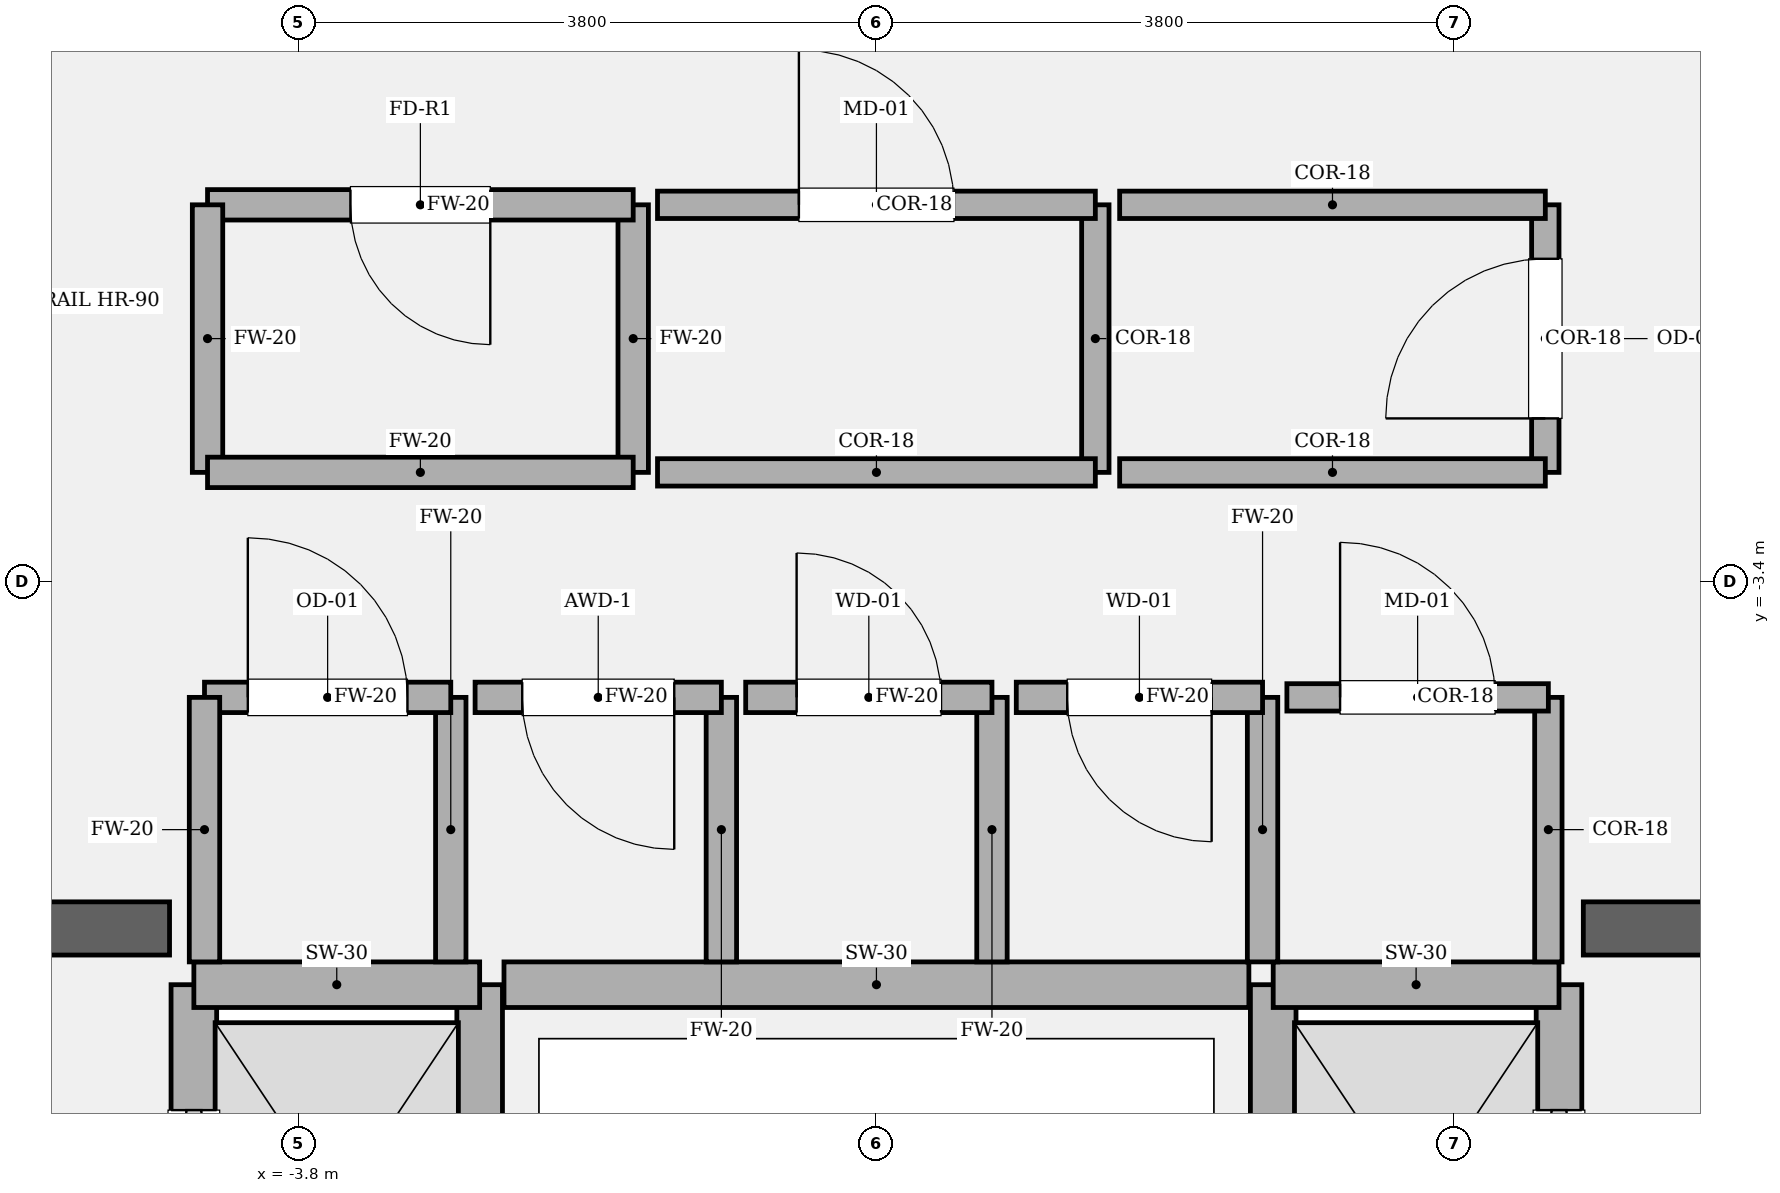
"""IFC4 building model, lengths in metres.
Left out: names, types, materials, properties, quantities, classifications, styles, units other than length and angle.
Written with IfcOpenShell. Run it as: python <this file> out.ifc"""

import sys

from ifc_helpers import new_model, si_unit, direction, frame, frame_2d, origin, place, context, subcontext, project, spatial, rectangle, extrude, element, fill, save


model = new_model("IFC4")
c1 = context("Model", 3, precision=1e-05, world=origin(), true_north=direction((0.0, 1.0)))
c2 = subcontext(c1, "Body", "Model", "MODEL_VIEW")
j1 = project(units=[si_unit("LENGTHUNIT", "METRE"), si_unit("PLANEANGLEUNIT", "RADIAN")], contexts=[c1])
p1 = place(None, origin())
s1 = spatial("IfcSite", under=j1, at=p1, CompositionType="ELEMENT")
p2 = place(p1, origin())
s2 = spatial("IfcBuilding", under=s1, at=p2, CompositionType="ELEMENT")
p3 = place(p2, frame((0.0, 0.0, 135.0)))
s3 = spatial("IfcBuildingStorey", under=s2, at=p3, CompositionType="ELEMENT", Elevation=135.0)
p4 = place(p3, frame((-9.875, -5.68, 0.0), z_axis=(0.0, 0.0, 1.0), x_axis=(1.0, 0.0, 0.0)))
e1 = element("IfcWall", 1, at=p4, inside=s3, PredefinedType="SOLIDWALL", context=c2, shape_type="SweptSolid", body=[
    extrude(rectangle(XDim=5.225, YDim=0.35, at=frame_2d((2.613, 0.0))), origin(), (0.0, 0.0, 1.0), 4.8),
])
p5 = place(p4, frame((1.335, 0.0, 0.0)))
e2 = element("IfcOpeningElement", 2, at=p5, cuts=e1, PredefinedType="OPENING", context=c2, shape_type="SweptSolid", body=[
    extrude(rectangle(XDim=1.18, YDim=2.2, at=frame_2d((0.59, 1.1))), frame((0.0, 0.185, 0.0), z_axis=(0.0, -1.0, 0.0), x_axis=(1.0, 0.0, 0.0)), (0.0, 0.0, 1.0), 0.37),
])
p6 = place(p3, frame((4.65, -5.68, 0.0), z_axis=(0.0, 0.0, 1.0), x_axis=(1.0, 0.0, 0.0)))
e3 = element("IfcWall", 3, at=p6, inside=s3, PredefinedType="SOLIDWALL", context=c2, shape_type="SweptSolid", body=[
    extrude(rectangle(XDim=5.225, YDim=0.35, at=frame_2d((2.613, 0.0))), origin(), (0.0, 0.0, 1.0), 4.8),
])
p7 = place(p6, frame((2.71, 0.0, 0.0)))
e4 = element("IfcOpeningElement", 4, at=p7, cuts=e3, PredefinedType="OPENING", context=c2, shape_type="SweptSolid", body=[
    extrude(rectangle(XDim=1.18, YDim=2.2, at=frame_2d((0.59, 1.1))), frame((0.0, 0.185, 0.0), z_axis=(0.0, -1.0, 0.0), x_axis=(1.0, 0.0, 0.0)), (0.0, 0.0, 1.0), 0.37),
])
p8 = place(p3, frame((-4.49, -8.82, 0.0), z_axis=(0.0, 0.0, 1.0), x_axis=(0.0, 1.0, 0.0)))
e5 = element("IfcWall", 5, at=p8, inside=s3, PredefinedType="SOLIDWALL", context=c2, shape_type="SweptSolid", body=[
    extrude(rectangle(XDim=2.77, YDim=0.3, at=frame_2d((1.385, 0.0))), origin(), (0.0, 0.0, 1.0), 4.52),
])
p9 = place(p8, frame((0.825, 0.0, 0.0)))
e6 = element("IfcOpeningElement", 6, at=p9, cuts=e5, PredefinedType="OPENING", context=c2, shape_type="SweptSolid", body=[
    extrude(rectangle(XDim=1.12, YDim=2.25, at=frame_2d((0.56, 1.125))), frame((0.0, 0.16, 0.0), z_axis=(0.0, -1.0, 0.0), x_axis=(1.0, 0.0, 0.0)), (0.0, 0.0, 1.0), 0.32),
])
p10 = place(p3, frame((-2.61, -8.82, 0.0), z_axis=(0.0, 0.0, 1.0), x_axis=(0.0, 1.0, 0.0)))
e7 = element("IfcWall", 7, at=p10, inside=s3, PredefinedType="SOLIDWALL", context=c2, shape_type="SweptSolid", body=[
    extrude(rectangle(XDim=2.77, YDim=0.3, at=frame_2d((1.385, 0.0))), origin(), (0.0, 0.0, 1.0), 4.52),
])
p11 = place(p3, frame((-4.49, -6.05, 0.0), z_axis=(0.0, 0.0, 1.0), x_axis=(1.0, 0.0, 0.0)))
e8 = element("IfcWall", 8, at=p11, inside=s3, PredefinedType="SOLIDWALL", context=c2, shape_type="SweptSolid", body=[
    extrude(rectangle(XDim=1.88, YDim=0.3, at=frame_2d((0.94, 0.0))), origin(), (0.0, 0.0, 1.0), 4.52),
])
p12 = place(p3, frame((4.49, -8.82, 0.0), z_axis=(0.0, 0.0, 1.0), x_axis=(0.0, 1.0, 0.0)))
e9 = element("IfcWall", 9, at=p12, inside=s3, PredefinedType="SOLIDWALL", context=c2, shape_type="SweptSolid", body=[
    extrude(rectangle(XDim=2.77, YDim=0.3, at=frame_2d((1.385, 0.0))), origin(), (0.0, 0.0, 1.0), 4.52),
])
p13 = place(p12, frame((0.825, 0.0, 0.0)))
e10 = element("IfcOpeningElement", 10, at=p13, cuts=e9, PredefinedType="OPENING", context=c2, shape_type="SweptSolid", body=[
    extrude(rectangle(XDim=1.12, YDim=2.25, at=frame_2d((0.56, 1.125))), frame((0.0, 0.16, 0.0), z_axis=(0.0, -1.0, 0.0), x_axis=(1.0, 0.0, 0.0)), (0.0, 0.0, 1.0), 0.32),
])
p14 = place(p3, frame((2.61, -8.82, 0.0), z_axis=(0.0, 0.0, 1.0), x_axis=(0.0, 1.0, 0.0)))
e11 = element("IfcWall", 11, at=p14, inside=s3, PredefinedType="SOLIDWALL", context=c2, shape_type="SweptSolid", body=[
    extrude(rectangle(XDim=2.77, YDim=0.3, at=frame_2d((1.385, 0.0))), origin(), (0.0, 0.0, 1.0), 4.52),
])
p15 = place(p3, frame((2.61, -6.05, 0.0), z_axis=(0.0, 0.0, 1.0), x_axis=(1.0, 0.0, 0.0)))
e12 = element("IfcWall", 12, at=p15, inside=s3, PredefinedType="SOLIDWALL", context=c2, shape_type="SweptSolid", body=[
    extrude(rectangle(XDim=1.88, YDim=0.3, at=frame_2d((0.94, 0.0))), origin(), (0.0, 0.0, 1.0), 4.52),
])
p16 = place(p3, frame((-2.45, -6.05, 0.0), z_axis=(0.0, 0.0, 1.0), x_axis=(1.0, 0.0, 0.0)))
e13 = element("IfcWall", 13, at=p16, inside=s3, PredefinedType="SOLIDWALL", context=c2, shape_type="SweptSolid", body=[
    extrude(rectangle(XDim=4.9, YDim=0.3, at=frame_2d((2.45, 0.0))), origin(), (0.0, 0.0, 1.0), 4.52),
])
p17 = place(p3, frame((-2.8, -5.9, 0.0), z_axis=(0.0, 0.0, 1.0), x_axis=(0.0, 1.0, 0.0)))
e14 = element("IfcWall", 14, at=p17, inside=s3, PredefinedType="SOLIDWALL", context=c2, shape_type="SweptSolid", body=[
    extrude(rectangle(XDim=1.74, YDim=0.2, at=frame_2d((0.87, 0.0))), origin(), (0.0, 0.0, 1.0), 4.52),
])
p18 = place(p3, frame((-2.8, -4.16, 0.0), z_axis=(0.0, 0.0, 1.0), x_axis=(-1.0, 0.0, 0.0)))
e15 = element("IfcWall", 15, at=p18, inside=s3, PredefinedType="SOLIDWALL", context=c2, shape_type="SweptSolid", body=[
    extrude(rectangle(XDim=1.62, YDim=0.2, at=frame_2d((0.81, 0.0))), origin(), (0.0, 0.0, 1.0), 4.52),
])
p19 = place(p18, frame((0.285, 0.0, 0.0)))
e16 = element("IfcOpeningElement", 16, at=p19, cuts=e15, PredefinedType="OPENING", context=c2, shape_type="SweptSolid", body=[
    extrude(rectangle(XDim=1.05, YDim=2.2, at=frame_2d((0.525, 1.1))), frame((0.0, 0.11, 0.0), z_axis=(0.0, -1.0, 0.0), x_axis=(1.0, 0.0, 0.0)), (0.0, 0.0, 1.0), 0.22),
])
for number, where, z_axis, x_axis in (
    (17, (-4.42, -4.16, 0.0), (0.0, 0.0, 1.0), (0.0, -1.0, 0.0)),
    (18, (-1.02, -5.9, 0.0), (0.0, 0.0, 1.0), (0.0, 1.0, 0.0)),
):
    element("IfcWall", number, at=place(p3, frame(where, z_axis=z_axis, x_axis=x_axis)), inside=s3, PredefinedType="SOLIDWALL", context=c2, shape_type="SweptSolid", body=[
        extrude(rectangle(XDim=1.74, YDim=0.2, at=frame_2d((0.87, 0.0))), origin(), (0.0, 0.0, 1.0), 4.52),
    ])
p20 = place(p3, frame((-1.02, -4.16, 0.0), z_axis=(0.0, 0.0, 1.0), x_axis=(-1.0, 0.0, 0.0)))
e19 = element("IfcWall", 19, at=p20, inside=s3, PredefinedType="SOLIDWALL", context=c2, shape_type="SweptSolid", body=[
    extrude(rectangle(XDim=1.62, YDim=0.2, at=frame_2d((0.81, 0.0))), origin(), (0.0, 0.0, 1.0), 4.52),
])
p21 = place(p20, frame((0.31, 0.0, 0.0)))
e20 = element("IfcOpeningElement", 20, at=p21, cuts=e19, PredefinedType="OPENING", context=c2, shape_type="SweptSolid", body=[
    extrude(rectangle(XDim=1.0, YDim=2.15, at=frame_2d((0.5, 1.075))), frame((0.0, 0.11, 0.0), z_axis=(0.0, -1.0, 0.0), x_axis=(1.0, 0.0, 0.0)), (0.0, 0.0, 1.0), 0.22),
])
p22 = place(p3, frame((0.76, -5.9, 0.0), z_axis=(0.0, 0.0, 1.0), x_axis=(0.0, 1.0, 0.0)))
e21 = element("IfcWall", 21, at=p22, inside=s3, PredefinedType="SOLIDWALL", context=c2, shape_type="SweptSolid", body=[
    extrude(rectangle(XDim=1.74, YDim=0.2, at=frame_2d((0.87, 0.0))), origin(), (0.0, 0.0, 1.0), 4.52),
])
p23 = place(p3, frame((0.76, -4.16, 0.0), z_axis=(0.0, 0.0, 1.0), x_axis=(-1.0, 0.0, 0.0)))
e22 = element("IfcWall", 22, at=p23, inside=s3, PredefinedType="SOLIDWALL", context=c2, shape_type="SweptSolid", body=[
    extrude(rectangle(XDim=1.62, YDim=0.2, at=frame_2d((0.81, 0.0))), origin(), (0.0, 0.0, 1.0), 4.52),
])
p24 = place(p23, frame((0.335, 0.0, 0.0)))
e23 = element("IfcOpeningElement", 23, at=p24, cuts=e22, PredefinedType="OPENING", context=c2, shape_type="SweptSolid", body=[
    extrude(rectangle(XDim=0.95, YDim=2.15, at=frame_2d((0.475, 1.075))), frame((0.0, 0.11, 0.0), z_axis=(0.0, -1.0, 0.0), x_axis=(1.0, 0.0, 0.0)), (0.0, 0.0, 1.0), 0.22),
])
p25 = place(p3, frame((2.54, -5.9, 0.0), z_axis=(0.0, 0.0, 1.0), x_axis=(0.0, 1.0, 0.0)))
e24 = element("IfcWall", 24, at=p25, inside=s3, PredefinedType="SOLIDWALL", context=c2, shape_type="SweptSolid", body=[
    extrude(rectangle(XDim=1.74, YDim=0.2, at=frame_2d((0.87, 0.0))), origin(), (0.0, 0.0, 1.0), 4.52),
])
p26 = place(p3, frame((2.54, -4.16, 0.0), z_axis=(0.0, 0.0, 1.0), x_axis=(-1.0, 0.0, 0.0)))
e25 = element("IfcWall", 25, at=p26, inside=s3, PredefinedType="SOLIDWALL", context=c2, shape_type="SweptSolid", body=[
    extrude(rectangle(XDim=1.62, YDim=0.2, at=frame_2d((0.81, 0.0))), origin(), (0.0, 0.0, 1.0), 4.52),
])
p27 = place(p26, frame((0.335, 0.0, 0.0)))
e26 = element("IfcOpeningElement", 26, at=p27, cuts=e25, PredefinedType="OPENING", context=c2, shape_type="SweptSolid", body=[
    extrude(rectangle(XDim=0.95, YDim=2.15, at=frame_2d((0.475, 1.075))), frame((0.0, 0.11, 0.0), z_axis=(0.0, -1.0, 0.0), x_axis=(1.0, 0.0, 0.0)), (0.0, 0.0, 1.0), 0.22),
])
p28 = place(p3, frame((4.42, -5.9, 0.0), z_axis=(0.0, 0.0, 1.0), x_axis=(0.0, 1.0, 0.0)))
e27 = element("IfcWall", 27, at=p28, inside=s3, PredefinedType="PARTITIONING", context=c2, shape_type="SweptSolid", body=[
    extrude(rectangle(XDim=1.74, YDim=0.18, at=frame_2d((0.87, 0.0))), origin(), (0.0, 0.0, 1.0), 4.52),
])
p29 = place(p3, frame((4.42, -4.16, 0.0), z_axis=(0.0, 0.0, 1.0), x_axis=(-1.0, 0.0, 0.0)))
e28 = element("IfcWall", 28, at=p29, inside=s3, PredefinedType="PARTITIONING", context=c2, shape_type="SweptSolid", body=[
    extrude(rectangle(XDim=1.72, YDim=0.18, at=frame_2d((0.86, 0.0))), origin(), (0.0, 0.0, 1.0), 4.52),
])
p30 = place(p29, frame((0.35, 0.0, 0.0)))
e29 = element("IfcOpeningElement", 29, at=p30, cuts=e28, PredefinedType="OPENING", context=c2, shape_type="SweptSolid", body=[
    extrude(rectangle(XDim=1.02, YDim=2.2, at=frame_2d((0.51, 1.1))), frame((0.0, 0.1, 0.0), z_axis=(0.0, -1.0, 0.0), x_axis=(1.0, 0.0, 0.0)), (0.0, 0.0, 1.0), 0.2),
])
p31 = place(p3, frame((-1.6, -2.68, 0.0), z_axis=(0.0, 0.0, 1.0), x_axis=(0.0, 1.0, 0.0)))
e30 = element("IfcWall", 30, at=p31, inside=s3, PredefinedType="SOLIDWALL", context=c2, shape_type="SweptSolid", body=[
    extrude(rectangle(XDim=1.76, YDim=0.2, at=frame_2d((0.88, 0.0))), origin(), (0.0, 0.0, 1.0), 4.52),
])
p32 = place(p3, frame((-1.6, -0.92, 0.0), z_axis=(0.0, 0.0, 1.0), x_axis=(-1.0, 0.0, 0.0)))
e31 = element("IfcWall", 31, at=p32, inside=s3, PredefinedType="SOLIDWALL", context=c2, shape_type="SweptSolid", body=[
    extrude(rectangle(XDim=2.8, YDim=0.2, at=frame_2d((1.4, 0.0))), origin(), (0.0, 0.0, 1.0), 4.52),
])
p33 = place(p32, frame((0.94, 0.0, 0.0)))
e32 = element("IfcOpeningElement", 32, at=p33, cuts=e31, PredefinedType="OPENING", context=c2, shape_type="SweptSolid", body=[
    extrude(rectangle(XDim=0.92, YDim=2.1, at=frame_2d((0.46, 1.05))), frame((0.0, 0.11, 0.0), z_axis=(0.0, -1.0, 0.0), x_axis=(1.0, 0.0, 0.0)), (0.0, 0.0, 1.0), 0.22),
])
p34 = place(p3, frame((-4.4, -0.92, 0.0), z_axis=(0.0, 0.0, 1.0), x_axis=(0.0, -1.0, 0.0)))
e33 = element("IfcWall", 33, at=p34, inside=s3, PredefinedType="SOLIDWALL", context=c2, shape_type="SweptSolid", body=[
    extrude(rectangle(XDim=1.76, YDim=0.2, at=frame_2d((0.88, 0.0))), origin(), (0.0, 0.0, 1.0), 4.52),
])
p35 = place(p3, frame((-4.4, -2.68, 0.0), z_axis=(0.0, 0.0, 1.0), x_axis=(1.0, 0.0, 0.0)))
e34 = element("IfcWall", 34, at=p35, inside=s3, PredefinedType="SOLIDWALL", context=c2, shape_type="SweptSolid", body=[
    extrude(rectangle(XDim=2.8, YDim=0.2, at=frame_2d((1.4, 0.0))), origin(), (0.0, 0.0, 1.0), 4.52),
])
p36 = place(p3, frame((1.44, -2.68, 0.0), z_axis=(0.0, 0.0, 1.0), x_axis=(0.0, 1.0, 0.0)))
e35 = element("IfcWall", 35, at=p36, inside=s3, PredefinedType="PARTITIONING", context=c2, shape_type="SweptSolid", body=[
    extrude(rectangle(XDim=1.76, YDim=0.18, at=frame_2d((0.88, 0.0))), origin(), (0.0, 0.0, 1.0), 4.52),
])
p37 = place(p3, frame((1.44, -0.92, 0.0), z_axis=(0.0, 0.0, 1.0), x_axis=(-1.0, 0.0, 0.0)))
e36 = element("IfcWall", 36, at=p37, inside=s3, PredefinedType="PARTITIONING", context=c2, shape_type="SweptSolid", body=[
    extrude(rectangle(XDim=2.88, YDim=0.18, at=frame_2d((1.44, 0.0))), origin(), (0.0, 0.0, 1.0), 4.52),
])
p38 = place(p37, frame((0.93, 0.0, 0.0)))
e37 = element("IfcOpeningElement", 37, at=p38, cuts=e36, PredefinedType="OPENING", context=c2, shape_type="SweptSolid", body=[
    extrude(rectangle(XDim=1.02, YDim=2.2, at=frame_2d((0.51, 1.1))), frame((0.0, 0.1, 0.0), z_axis=(0.0, -1.0, 0.0), x_axis=(1.0, 0.0, 0.0)), (0.0, 0.0, 1.0), 0.2),
])
p39 = place(p3, frame((-1.44, -2.68, 0.0), z_axis=(0.0, 0.0, 1.0), x_axis=(1.0, 0.0, 0.0)))
e38 = element("IfcWall", 38, at=p39, inside=s3, PredefinedType="PARTITIONING", context=c2, shape_type="SweptSolid", body=[
    extrude(rectangle(XDim=2.88, YDim=0.18, at=frame_2d((1.44, 0.0))), origin(), (0.0, 0.0, 1.0), 4.52),
])
p40 = place(p3, frame((4.4, -2.68, 0.0), z_axis=(0.0, 0.0, 1.0), x_axis=(0.0, 1.0, 0.0)))
e39 = element("IfcWall", 39, at=p40, inside=s3, PredefinedType="PARTITIONING", context=c2, shape_type="SweptSolid", body=[
    extrude(rectangle(XDim=1.76, YDim=0.18, at=frame_2d((0.88, 0.0))), origin(), (0.0, 0.0, 1.0), 4.52),
])
p41 = place(p40, frame((0.355, 0.0, 0.0)))
e40 = element("IfcOpeningElement", 40, at=p41, cuts=e39, PredefinedType="OPENING", context=c2, shape_type="SweptSolid", body=[
    extrude(rectangle(XDim=1.05, YDim=2.2, at=frame_2d((0.525, 1.1))), frame((0.0, 0.1, 0.0), z_axis=(0.0, -1.0, 0.0), x_axis=(1.0, 0.0, 0.0)), (0.0, 0.0, 1.0), 0.2),
])
for number, where, z_axis, x_axis in (
    (41, (4.4, -0.92, 0.0), (0.0, 0.0, 1.0), (-1.0, 0.0, 0.0)),
    (42, (1.6, -2.68, 0.0), (0.0, 0.0, 1.0), (1.0, 0.0, 0.0)),
):
    element("IfcWall", number, at=place(p3, frame(where, z_axis=z_axis, x_axis=x_axis)), inside=s3, PredefinedType="PARTITIONING", context=c2, shape_type="SweptSolid", body=[
        extrude(rectangle(XDim=2.8, YDim=0.18, at=frame_2d((1.4, 0.0))), origin(), (0.0, 0.0, 1.0), 4.52),
    ])
p42 = place(p9, origin())
e43 = element("IfcDoor", 43, at=p42, inside=s3, OperationType="SLIDING_TO_LEFT", PredefinedType="DOOR", context=c2, shape_type="SweptSolid", body=[
    extrude(rectangle(XDim=1.12, YDim=2.25, at=frame_2d((0.56, 1.125))), frame((0.0, 0.025, 0.0), z_axis=(0.0, -1.0, 0.0), x_axis=(1.0, 0.0, 0.0)), (0.0, 0.0, 1.0), 0.05),
])
fill(e6, e43)
p43 = place(p13, origin())
e44 = element("IfcDoor", 44, at=p43, inside=s3, OperationType="SLIDING_TO_RIGHT", PredefinedType="DOOR", context=c2, shape_type="SweptSolid", body=[
    extrude(rectangle(XDim=1.12, YDim=2.25, at=frame_2d((0.56, 1.125))), frame((0.0, 0.025, 0.0), z_axis=(0.0, -1.0, 0.0), x_axis=(1.0, 0.0, 0.0)), (0.0, 0.0, 1.0), 0.05),
])
fill(e10, e44)
p44 = place(p19, origin())
e45 = element("IfcDoor", 45, at=p44, inside=s3, OperationType="SINGLE_SWING_RIGHT", PredefinedType="DOOR", context=c2, shape_type="SweptSolid", body=[
    extrude(rectangle(XDim=1.05, YDim=2.2, at=frame_2d((0.525, 1.1))), frame((0.0, 0.025, 0.0), z_axis=(0.0, -1.0, 0.0), x_axis=(1.0, 0.0, 0.0)), (0.0, 0.0, 1.0), 0.05),
])
fill(e16, e45)
p45 = place(p21, origin())
e46 = element("IfcDoor", 46, at=p45, inside=s3, OperationType="SINGLE_SWING_LEFT", PredefinedType="DOOR", context=c2, shape_type="SweptSolid", body=[
    extrude(rectangle(XDim=1.0, YDim=2.15, at=frame_2d((0.5, 1.075))), frame((0.0, 0.025, 0.0), z_axis=(0.0, -1.0, 0.0), x_axis=(1.0, 0.0, 0.0)), (0.0, 0.0, 1.0), 0.05),
])
fill(e20, e46)
p46 = place(p24, origin())
e47 = element("IfcDoor", 47, at=p46, inside=s3, OperationType="SINGLE_SWING_RIGHT", PredefinedType="DOOR", context=c2, shape_type="SweptSolid", body=[
    extrude(rectangle(XDim=0.95, YDim=2.15, at=frame_2d((0.475, 1.075))), frame((0.0, 0.025, 0.0), z_axis=(0.0, -1.0, 0.0), x_axis=(1.0, 0.0, 0.0)), (0.0, 0.0, 1.0), 0.05),
])
fill(e23, e47)
p47 = place(p27, origin())
e48 = element("IfcDoor", 48, at=p47, inside=s3, OperationType="SINGLE_SWING_LEFT", PredefinedType="DOOR", context=c2, shape_type="SweptSolid", body=[
    extrude(rectangle(XDim=0.95, YDim=2.15, at=frame_2d((0.475, 1.075))), frame((0.0, 0.025, 0.0), z_axis=(0.0, -1.0, 0.0), x_axis=(1.0, 0.0, 0.0)), (0.0, 0.0, 1.0), 0.05),
])
fill(e26, e48)
p48 = place(p30, origin())
e49 = element("IfcDoor", 49, at=p48, inside=s3, OperationType="SINGLE_SWING_RIGHT", PredefinedType="DOOR", context=c2, shape_type="SweptSolid", body=[
    extrude(rectangle(XDim=1.02, YDim=2.2, at=frame_2d((0.51, 1.1))), frame((0.0, 0.025, 0.0), z_axis=(0.0, -1.0, 0.0), x_axis=(1.0, 0.0, 0.0)), (0.0, 0.0, 1.0), 0.05),
])
fill(e29, e49)
p49 = place(p33, origin())
e50 = element("IfcDoor", 50, at=p49, inside=s3, OperationType="SINGLE_SWING_LEFT", PredefinedType="DOOR", context=c2, shape_type="SweptSolid", body=[
    extrude(rectangle(XDim=0.92, YDim=2.1, at=frame_2d((0.46, 1.05))), frame((0.0, 0.025, 0.0), z_axis=(0.0, -1.0, 0.0), x_axis=(1.0, 0.0, 0.0)), (0.0, 0.0, 1.0), 0.05),
])
fill(e32, e50)
p50 = place(p38, origin())
e51 = element("IfcDoor", 51, at=p50, inside=s3, OperationType="SINGLE_SWING_RIGHT", PredefinedType="DOOR", context=c2, shape_type="SweptSolid", body=[
    extrude(rectangle(XDim=1.02, YDim=2.2, at=frame_2d((0.51, 1.1))), frame((0.0, 0.025, 0.0), z_axis=(0.0, -1.0, 0.0), x_axis=(1.0, 0.0, 0.0)), (0.0, 0.0, 1.0), 0.05),
])
fill(e37, e51)
p51 = place(p41, origin())
e52 = element("IfcDoor", 52, at=p51, inside=s3, OperationType="SINGLE_SWING_LEFT", PredefinedType="DOOR", context=c2, shape_type="SweptSolid", body=[
    extrude(rectangle(XDim=1.05, YDim=2.2, at=frame_2d((0.525, 1.1))), frame((0.0, 0.025, 0.0), z_axis=(0.0, -1.0, 0.0), x_axis=(1.0, 0.0, 0.0)), (0.0, 0.0, 1.0), 0.05),
])
fill(e40, e52)
save(model, sys.argv[1])
